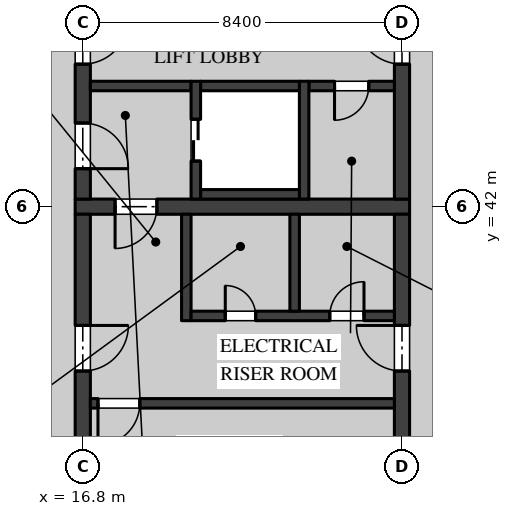
"""IFC4 building model, lengths in metres.
Left out: names, types, materials, properties, quantities, classifications, styles, units other than length and angle.
Written with IfcOpenShell. Run it as: python <this file> out.ifc"""

import sys

from ifc_helpers import new_model, si_unit, direction, frame, frame_2d, origin, place, context, subcontext, project, spatial, rectangle, extrude, element, fill, save


model = new_model("IFC4")
c1 = context("Model", 3, precision=1e-05, world=origin(), true_north=direction((0.0, 1.0)))
c2 = subcontext(c1, "Body", "Model", "MODEL_VIEW")
j1 = project(units=[si_unit("LENGTHUNIT", "METRE"), si_unit("PLANEANGLEUNIT", "RADIAN")], contexts=[c1])
p1 = place(None, origin())
s1 = spatial("IfcSite", under=j1, at=p1, CompositionType="ELEMENT")
p2 = place(p1, origin())
s2 = spatial("IfcBuilding", under=s1, at=p2, CompositionType="ELEMENT")
p3 = place(p2, frame((0.0, 0.0, 18.9)))
s3 = spatial("IfcBuildingStorey", under=s2, at=p3, CompositionType="ELEMENT", Elevation=18.9)
p4 = place(p3, frame((16.6, 42.0, 0.0), z_axis=(0.0, 0.0, 1.0), x_axis=(1.0, 0.0, 0.0)))
e1 = element("IfcWall", 1, at=p4, inside=s3, PredefinedType="SHEAR", context=c2, shape_type="SweptSolid", body=[
    extrude(rectangle(XDim=8.8, YDim=0.4, at=frame_2d((4.4, 0.0))), origin(), (0.0, 0.0, 1.0), 4.37),
])
p5 = place(p4, frame((1.05, 0.0, 0.0)))
e2 = element("IfcOpeningElement", 2, at=p5, cuts=e1, PredefinedType="OPENING", context=c2, shape_type="SweptSolid", body=[
    extrude(rectangle(XDim=1.1, YDim=2.1, at=frame_2d((0.55, 1.05))), frame((0.0, 0.21, 0.0), z_axis=(0.0, -1.0, 0.0), x_axis=(1.0, 0.0, 0.0)), (0.0, 0.0, 1.0), 0.42),
])
p6 = place(p3, frame((16.8, 42.2, 0.0), z_axis=(0.0, 0.0, 1.0), x_axis=(0.0, 1.0, 0.0)))
e3 = element("IfcWall", 3, at=p6, inside=s3, PredefinedType="SHEAR", context=c2, shape_type="SweptSolid", body=[
    extrude(rectangle(XDim=8.0, YDim=0.4, at=frame_2d((4.0, 0.0))), origin(), (0.0, 0.0, 1.0), 4.37),
])
p7 = place(p6, frame((3.55, 0.0, 0.0)))
e4 = element("IfcOpeningElement", 4, at=p7, cuts=e3, PredefinedType="OPENING", context=c2, shape_type="SweptSolid", body=[
    extrude(rectangle(XDim=1.2, YDim=2.1, at=frame_2d((0.6, 1.05))), frame((0.0, 0.21, 0.0), z_axis=(0.0, -1.0, 0.0), x_axis=(1.0, 0.0, 0.0)), (0.0, 0.0, 1.0), 0.42),
])
p8 = place(p6, frame((0.8, 0.0, 0.0)))
e5 = element("IfcOpeningElement", 5, at=p8, cuts=e3, PredefinedType="OPENING", context=c2, shape_type="SweptSolid", body=[
    extrude(rectangle(XDim=1.2, YDim=2.1, at=frame_2d((0.6, 1.05))), frame((0.0, 0.21, 0.0), z_axis=(0.0, -1.0, 0.0), x_axis=(1.0, 0.0, 0.0)), (0.0, 0.0, 1.0), 0.42),
])
p9 = place(p3, frame((25.2, 42.2, 0.0), z_axis=(0.0, 0.0, 1.0), x_axis=(0.0, 1.0, 0.0)))
e6 = element("IfcWall", 6, at=p9, inside=s3, PredefinedType="SHEAR", context=c2, shape_type="SweptSolid", body=[
    extrude(rectangle(XDim=8.0, YDim=0.4, at=frame_2d((4.0, 0.0))), origin(), (0.0, 0.0, 1.0), 4.37),
])
p10 = place(p9, frame((3.55, 0.0, 0.0)))
e7 = element("IfcOpeningElement", 7, at=p10, cuts=e6, PredefinedType="OPENING", context=c2, shape_type="SweptSolid", body=[
    extrude(rectangle(XDim=1.2, YDim=2.1, at=frame_2d((0.6, 1.05))), frame((0.0, 0.21, 0.0), z_axis=(0.0, -1.0, 0.0), x_axis=(1.0, 0.0, 0.0)), (0.0, 0.0, 1.0), 0.42),
])
p11 = place(p3, frame((25.0, 45.175, 0.0), z_axis=(0.0, 0.0, 1.0), x_axis=(-1.0, 0.0, 0.0)))
e8 = element("IfcWall", 8, at=p11, inside=s3, PredefinedType="SOLIDWALL", context=c2, shape_type="SweptSolid", body=[
    extrude(rectangle(XDim=2.25, YDim=0.25, at=frame_2d((1.125, 0.0))), origin(), (0.0, 0.0, 1.0), 4.37),
])
p12 = place(p11, frame((0.675, 0.0, 0.0)))
e9 = element("IfcOpeningElement", 9, at=p12, cuts=e8, PredefinedType="OPENING", context=c2, shape_type="SweptSolid", body=[
    extrude(rectangle(XDim=0.9, YDim=2.1, at=frame_2d((0.45, 1.05))), frame((0.0, 0.135, 0.0), z_axis=(0.0, -1.0, 0.0), x_axis=(1.0, 0.0, 0.0)), (0.0, 0.0, 1.0), 0.27),
])
p13 = place(p3, frame((19.65, 45.175, 0.0), z_axis=(0.0, 0.0, 1.0), x_axis=(-1.0, 0.0, 0.0)))
e10 = element("IfcWall", 10, at=p13, inside=s3, PredefinedType="SOLIDWALL", context=c2, shape_type="SweptSolid", body=[
    extrude(rectangle(XDim=2.65, YDim=0.25, at=frame_2d((1.325, 0.0))), origin(), (0.0, 0.0, 1.0), 4.37),
])
p14 = place(p3, frame((16.8, 33.8, 0.0), z_axis=(0.0, 0.0, 1.0), x_axis=(0.0, 1.0, 0.0)))
e11 = element("IfcWall", 11, at=p14, inside=s3, PredefinedType="SHEAR", context=c2, shape_type="SweptSolid", body=[
    extrude(rectangle(XDim=8.0, YDim=0.4, at=frame_2d((4.0, 0.0))), origin(), (0.0, 0.0, 1.0), 4.37),
])
p15 = place(p14, frame((3.875, 0.0, 0.0)))
e12 = element("IfcOpeningElement", 12, at=p15, cuts=e11, PredefinedType="OPENING", context=c2, shape_type="SweptSolid", body=[
    extrude(rectangle(XDim=1.2, YDim=2.1, at=frame_2d((0.6, 1.05))), frame((0.0, 0.21, 0.0), z_axis=(0.0, -1.0, 0.0), x_axis=(1.0, 0.0, 0.0)), (0.0, 0.0, 1.0), 0.42),
])
p16 = place(p3, frame((25.2, 33.8, 0.0), z_axis=(0.0, 0.0, 1.0), x_axis=(0.0, 1.0, 0.0)))
e13 = element("IfcWall", 13, at=p16, inside=s3, PredefinedType="SHEAR", context=c2, shape_type="SweptSolid", body=[
    extrude(rectangle(XDim=8.0, YDim=0.4, at=frame_2d((4.0, 0.0))), origin(), (0.0, 0.0, 1.0), 4.37),
])
p17 = place(p16, frame((3.875, 0.0, 0.0)))
e14 = element("IfcOpeningElement", 14, at=p17, cuts=e13, PredefinedType="OPENING", context=c2, shape_type="SweptSolid", body=[
    extrude(rectangle(XDim=1.2, YDim=2.1, at=frame_2d((0.6, 1.05))), frame((0.0, 0.21, 0.0), z_axis=(0.0, -1.0, 0.0), x_axis=(1.0, 0.0, 0.0)), (0.0, 0.0, 1.0), 0.42),
])
p18 = place(p3, frame((17.0, 36.825, 0.0), z_axis=(0.0, 0.0, 1.0), x_axis=(1.0, 0.0, 0.0)))
e15 = element("IfcWall", 15, at=p18, inside=s3, PredefinedType="SOLIDWALL", context=c2, shape_type="SweptSolid", body=[
    extrude(rectangle(XDim=8.0, YDim=0.25, at=frame_2d((4.0, 0.0))), origin(), (0.0, 0.0, 1.0), 4.37),
])
p19 = place(p18, frame((0.2, 0.0, 0.0)))
e16 = element("IfcOpeningElement", 16, at=p19, cuts=e15, PredefinedType="OPENING", context=c2, shape_type="SweptSolid", body=[
    extrude(rectangle(XDim=1.1, YDim=2.1, at=frame_2d((0.55, 1.05))), frame((0.0, 0.135, 0.0), z_axis=(0.0, -1.0, 0.0), x_axis=(1.0, 0.0, 0.0)), (0.0, 0.0, 1.0), 0.27),
])
p20 = place(p3, frame((19.525, 39.0, 0.0), z_axis=(0.0, 0.0, 1.0), x_axis=(0.0, 1.0, 0.0)))
e17 = element("IfcWall", 17, at=p20, inside=s3, PredefinedType="SOLIDWALL", context=c2, shape_type="SweptSolid", body=[
    extrude(rectangle(XDim=2.8, YDim=0.25, at=frame_2d((1.4, 0.0))), origin(), (0.0, 0.0, 1.0), 4.37),
])
p21 = place(p3, frame((19.65, 39.125, 0.0), z_axis=(0.0, 0.0, 1.0), x_axis=(1.0, 0.0, 0.0)))
e18 = element("IfcWall", 18, at=p21, inside=s3, PredefinedType="SOLIDWALL", context=c2, shape_type="SweptSolid", body=[
    extrude(rectangle(XDim=5.35, YDim=0.25, at=frame_2d((2.675, 0.0))), origin(), (0.0, 0.0, 1.0), 4.37),
])
p22 = place(p21, frame((3.65, 0.0, 0.0)))
e19 = element("IfcOpeningElement", 19, at=p22, cuts=e18, PredefinedType="OPENING", context=c2, shape_type="SweptSolid", body=[
    extrude(rectangle(XDim=0.9, YDim=2.1, at=frame_2d((0.45, 1.05))), frame((0.0, 0.135, 0.0), z_axis=(0.0, -1.0, 0.0), x_axis=(1.0, 0.0, 0.0)), (0.0, 0.0, 1.0), 0.27),
])
p23 = place(p21, frame((0.9, 0.0, 0.0)))
e20 = element("IfcOpeningElement", 20, at=p23, cuts=e18, PredefinedType="OPENING", context=c2, shape_type="SweptSolid", body=[
    extrude(rectangle(XDim=0.8, YDim=2.1, at=frame_2d((0.4, 1.05))), frame((0.0, 0.135, 0.0), z_axis=(0.0, -1.0, 0.0), x_axis=(1.0, 0.0, 0.0)), (0.0, 0.0, 1.0), 0.27),
])
p24 = place(p3, frame((22.375, 39.25, 0.0), z_axis=(0.0, 0.0, 1.0), x_axis=(0.0, 1.0, 0.0)))
e21 = element("IfcWall", 21, at=p24, inside=s3, PredefinedType="SOLIDWALL", context=c2, shape_type="SweptSolid", body=[
    extrude(rectangle(XDim=2.55, YDim=0.25, at=frame_2d((1.275, 0.0))), origin(), (0.0, 0.0, 1.0), 4.37),
])
p25 = place(p3, frame((22.625, 42.2, 0.0), z_axis=(0.0, 0.0, 1.0), x_axis=(0.0, 1.0, 0.0)))
e22 = element("IfcWall", 22, at=p25, inside=s3, PredefinedType="SOLIDWALL", context=c2, shape_type="SweptSolid", body=[
    extrude(rectangle(XDim=3.1, YDim=0.25, at=frame_2d((1.55, 0.0))), origin(), (0.0, 0.0, 1.0), 4.37),
])
for number, where, z_axis, x_axis in (
    (23, (19.9, 45.175, 0.0), (0.0, 0.0, 1.0), (1.0, 0.0, 0.0)),
    (24, (19.9, 42.325, 0.0), (0.0, 0.0, 1.0), (1.0, 0.0, 0.0)),
):
    element("IfcWall", number, at=place(p3, frame(where, z_axis=z_axis, x_axis=x_axis)), inside=s3, PredefinedType="SOLIDWALL", context=c2, shape_type="SweptSolid", body=[
        extrude(rectangle(XDim=2.6, YDim=0.25, at=frame_2d((1.3, 0.0))), origin(), (0.0, 0.0, 1.0), 4.37),
    ])
p26 = place(p3, frame((19.775, 42.2, 0.0), z_axis=(0.0, 0.0, 1.0), x_axis=(0.0, 1.0, 0.0)))
e25 = element("IfcWall", 25, at=p26, inside=s3, PredefinedType="SOLIDWALL", context=c2, shape_type="SweptSolid", body=[
    extrude(rectangle(XDim=3.1, YDim=0.25, at=frame_2d((1.55, 0.0))), origin(), (0.0, 0.0, 1.0), 4.37),
])
p27 = place(p26, frame((1.0, 0.0, 0.0)))
e26 = element("IfcOpeningElement", 26, at=p27, cuts=e25, PredefinedType="OPENING", context=c2, shape_type="SweptSolid", body=[
    extrude(rectangle(XDim=1.1, YDim=2.1, at=frame_2d((0.55, 1.05))), frame((0.0, 0.135, 0.0), z_axis=(0.0, -1.0, 0.0), x_axis=(1.0, 0.0, 0.0)), (0.0, 0.0, 1.0), 0.27),
])
p28 = place(p7, frame((1.2, 0.0, 0.0), z_axis=(0.0, 0.0, 1.0), x_axis=(-1.0, 0.0, 0.0)))
e27 = element("IfcDoor", 27, at=p28, inside=s3, OperationType="SINGLE_SWING_RIGHT", PredefinedType="DOOR", context=c2, shape_type="SweptSolid", body=[
    extrude(rectangle(XDim=1.2, YDim=2.1, at=frame_2d((0.6, 1.05))), frame((0.0, 0.035, 0.0), z_axis=(0.0, -1.0, 0.0), x_axis=(1.0, 0.0, 0.0)), (0.0, 0.0, 1.0), 0.07),
])
fill(e4, e27)
p29 = place(p10, origin())
e28 = element("IfcDoor", 28, at=p29, inside=s3, OperationType="SINGLE_SWING_LEFT", PredefinedType="DOOR", context=c2, shape_type="SweptSolid", body=[
    extrude(rectangle(XDim=1.2, YDim=2.1, at=frame_2d((0.6, 1.05))), frame((0.0, 0.035, 0.0), z_axis=(0.0, -1.0, 0.0), x_axis=(1.0, 0.0, 0.0)), (0.0, 0.0, 1.0), 0.07),
])
fill(e7, e28)
p30 = place(p8, frame((1.2, 0.0, 0.0), z_axis=(0.0, 0.0, 1.0), x_axis=(-1.0, 0.0, 0.0)))
e29 = element("IfcDoor", 29, at=p30, inside=s3, OperationType="SINGLE_SWING_LEFT", PredefinedType="DOOR", context=c2, shape_type="SweptSolid", body=[
    extrude(rectangle(XDim=1.2, YDim=2.1, at=frame_2d((0.6, 1.05))), frame((0.0, 0.035, 0.0), z_axis=(0.0, -1.0, 0.0), x_axis=(1.0, 0.0, 0.0)), (0.0, 0.0, 1.0), 0.07),
])
fill(e5, e29)
p31 = place(p5, frame((1.1, 0.0, 0.0), z_axis=(0.0, 0.0, 1.0), x_axis=(-1.0, 0.0, 0.0)))
e30 = element("IfcDoor", 30, at=p31, inside=s3, OperationType="SINGLE_SWING_LEFT", PredefinedType="DOOR", context=c2, shape_type="SweptSolid", body=[
    extrude(rectangle(XDim=1.1, YDim=2.1, at=frame_2d((0.55, 1.05))), frame((0.0, 0.035, 0.0), z_axis=(0.0, -1.0, 0.0), x_axis=(1.0, 0.0, 0.0)), (0.0, 0.0, 1.0), 0.07),
])
fill(e2, e30)
p32 = place(p12, origin())
e31 = element("IfcDoor", 31, at=p32, inside=s3, OperationType="SINGLE_SWING_LEFT", PredefinedType="DOOR", context=c2, shape_type="SweptSolid", body=[
    extrude(rectangle(XDim=0.9, YDim=2.1, at=frame_2d((0.45, 1.05))), frame((0.0, 0.05, 0.0), z_axis=(0.0, -1.0, 0.0), x_axis=(1.0, 0.0, 0.0)), (0.0, 0.0, 1.0), 0.1),
])
fill(e9, e31)
p33 = place(p22, origin())
e32 = element("IfcDoor", 32, at=p33, inside=s3, OperationType="SINGLE_SWING_LEFT", PredefinedType="DOOR", context=c2, shape_type="SweptSolid", body=[
    extrude(rectangle(XDim=0.9, YDim=2.1, at=frame_2d((0.45, 1.05))), frame((0.0, 0.035, 0.0), z_axis=(0.0, -1.0, 0.0), x_axis=(1.0, 0.0, 0.0)), (0.0, 0.0, 1.0), 0.07),
])
fill(e19, e32)
p34 = place(p15, frame((1.2, 0.0, 0.0), z_axis=(0.0, 0.0, 1.0), x_axis=(-1.0, 0.0, 0.0)))
e33 = element("IfcDoor", 33, at=p34, inside=s3, OperationType="SINGLE_SWING_RIGHT", PredefinedType="DOOR", context=c2, shape_type="SweptSolid", body=[
    extrude(rectangle(XDim=1.2, YDim=2.1, at=frame_2d((0.6, 1.05))), frame((0.0, 0.035, 0.0), z_axis=(0.0, -1.0, 0.0), x_axis=(1.0, 0.0, 0.0)), (0.0, 0.0, 1.0), 0.07),
])
fill(e12, e33)
p35 = place(p17, origin())
e34 = element("IfcDoor", 34, at=p35, inside=s3, OperationType="SINGLE_SWING_LEFT", PredefinedType="DOOR", context=c2, shape_type="SweptSolid", body=[
    extrude(rectangle(XDim=1.2, YDim=2.1, at=frame_2d((0.6, 1.05))), frame((0.0, 0.035, 0.0), z_axis=(0.0, -1.0, 0.0), x_axis=(1.0, 0.0, 0.0)), (0.0, 0.0, 1.0), 0.07),
])
fill(e14, e34)
p36 = place(p23, origin())
e35 = element("IfcDoor", 35, at=p36, inside=s3, OperationType="SINGLE_SWING_RIGHT", PredefinedType="DOOR", context=c2, shape_type="SweptSolid", body=[
    extrude(rectangle(XDim=0.8, YDim=2.1, at=frame_2d((0.4, 1.05))), frame((0.0, 0.035, 0.0), z_axis=(0.0, -1.0, 0.0), x_axis=(1.0, 0.0, 0.0)), (0.0, 0.0, 1.0), 0.07),
])
fill(e20, e35)
p37 = place(p19, frame((1.1, 0.0, 0.0), z_axis=(0.0, 0.0, 1.0), x_axis=(-1.0, 0.0, 0.0)))
e36 = element("IfcDoor", 36, at=p37, inside=s3, OperationType="SINGLE_SWING_LEFT", PredefinedType="DOOR", context=c2, shape_type="SweptSolid", body=[
    extrude(rectangle(XDim=1.1, YDim=2.1, at=frame_2d((0.55, 1.05))), frame((0.0, 0.035, 0.0), z_axis=(0.0, -1.0, 0.0), x_axis=(1.0, 0.0, 0.0)), (0.0, 0.0, 1.0), 0.07),
])
fill(e16, e36)
p38 = place(p27, origin())
e37 = element("IfcDoor", 37, at=p38, inside=s3, OperationType="DOUBLE_DOOR_SLIDING", PredefinedType="DOOR", context=c2, shape_type="SweptSolid", body=[
    extrude(rectangle(XDim=1.1, YDim=2.1, at=frame_2d((0.55, 1.05))), frame((0.0, 0.04, 0.0), z_axis=(0.0, -1.0, 0.0), x_axis=(1.0, 0.0, 0.0)), (0.0, 0.0, 1.0), 0.08),
])
fill(e26, e37)
save(model, sys.argv[1])
